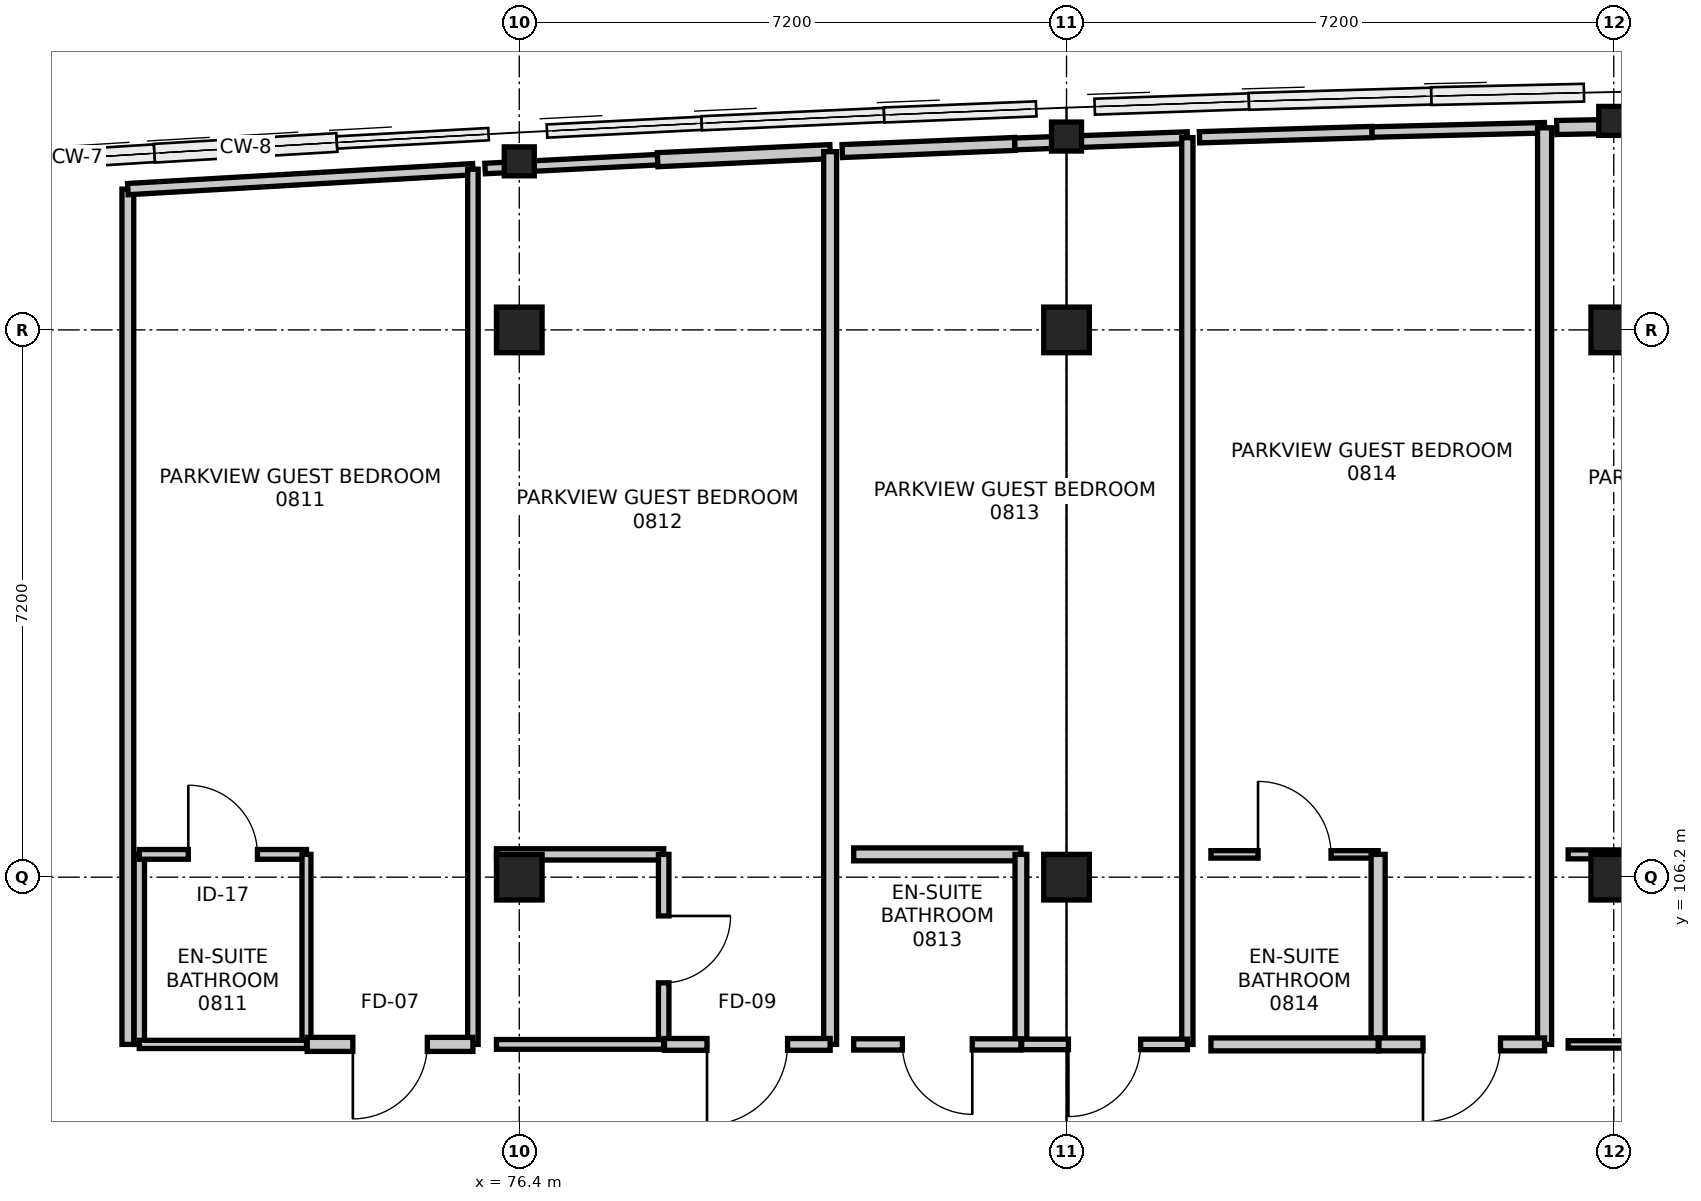
"""IFC4 building model, lengths in metres.
Left out: names, types, materials, properties, quantities, classifications, styles, units other than length and angle.
Written with IfcOpenShell. Run it as: python <this file> out.ifc"""

import sys

from ifc_helpers import new_model, si_unit, direction, frame, frame_2d, origin, origin_2d, place, context, subcontext, project, spatial, rectangle, i_section, extrude, element, fill, save


model = new_model("IFC4")
c1 = context("Model", 3, precision=1e-05, world=origin(), true_north=direction((0.0, 1.0)))
c2 = subcontext(c1, "Body", "Model", "MODEL_VIEW")
j1 = project(units=[si_unit("LENGTHUNIT", "METRE"), si_unit("PLANEANGLEUNIT", "RADIAN")], contexts=[c1])
p1 = place(None, origin())
s1 = spatial("IfcSite", under=j1, at=p1, CompositionType="ELEMENT")
p2 = place(p1, origin())
s2 = spatial("IfcBuilding", under=s1, at=p2, CompositionType="ELEMENT")
p3 = place(p2, frame((0.0, 0.0, 33.6)))
s3 = spatial("IfcBuildingStorey", under=s2, at=p3, CompositionType="ELEMENT", Elevation=33.6)
for number, where, z_axis, x_axis in (
    (1, (76.4, 106.2, 0.0), (0.0, 0.0, 1.0), (1.0, 0.0, 0.0)),
    (2, (76.4, 113.4, 0.0), (0.0, 0.0, 1.0), (1.0, 0.0, 0.0)),
):
    element("IfcColumn", number, at=place(p3, frame(where, z_axis=z_axis, x_axis=x_axis)), inside=s3, PredefinedType="COLUMN", context=c2, shape_type="SweptSolid", body=[
        extrude(rectangle(XDim=0.6, YDim=0.6, at=origin_2d()), origin(), (0.0, 0.0, 1.0), 3.6),
    ])
p4 = place(p3, frame((76.4, 115.618, 0.0), z_axis=(0.0, 0.0, 1.0), x_axis=(1.0, 0.0, 0.0)))
e3 = element("IfcColumn", 3, at=p4, inside=s3, PredefinedType="COLUMN", context=c2, shape_type="SweptSolid", body=[
    extrude(i_section(OverallWidth=0.395, OverallDepth=0.381, WebThickness=0.018, FlangeThickness=0.03, FilletRadius=0.015, at=origin_2d()), origin(), (0.0, 0.0, 1.0), 3.6),
])
for number, where, z_axis, x_axis in (
    (4, (83.6, 106.2, 0.0), (0.0, 0.0, 1.0), (1.0, 0.0, 0.0)),
    (5, (83.6, 113.4, 0.0), (0.0, 0.0, 1.0), (1.0, 0.0, 0.0)),
):
    element("IfcColumn", number, at=place(p3, frame(where, z_axis=z_axis, x_axis=x_axis)), inside=s3, PredefinedType="COLUMN", context=c2, shape_type="SweptSolid", body=[
        extrude(rectangle(XDim=0.6, YDim=0.6, at=origin_2d()), origin(), (0.0, 0.0, 1.0), 3.6),
    ])
p5 = place(p3, frame((83.6, 115.944, 0.0), z_axis=(0.0, 0.0, 1.0), x_axis=(1.0, 0.0, 0.0)))
e6 = element("IfcColumn", 6, at=p5, inside=s3, PredefinedType="COLUMN", context=c2, shape_type="SweptSolid", body=[
    extrude(i_section(OverallWidth=0.395, OverallDepth=0.381, WebThickness=0.018, FlangeThickness=0.03, FilletRadius=0.015, at=origin_2d()), origin(), (0.0, 0.0, 1.0), 3.6),
])
for number, where, z_axis, x_axis in (
    (7, (90.8, 106.2, 0.0), (0.0, 0.0, 1.0), (1.0, 0.0, 0.0)),
    (8, (90.8, 113.4, 0.0), (0.0, 0.0, 1.0), (1.0, 0.0, 0.0)),
):
    element("IfcColumn", number, at=place(p3, frame(where, z_axis=z_axis, x_axis=x_axis)), inside=s3, PredefinedType="COLUMN", context=c2, shape_type="SweptSolid", body=[
        extrude(rectangle(XDim=0.6, YDim=0.6, at=origin_2d()), origin(), (0.0, 0.0, 1.0), 3.6),
    ])
p6 = place(p3, frame((90.8, 116.15, 0.0), z_axis=(0.0, 0.0, 1.0), x_axis=(1.0, 0.0, 0.0)))
e9 = element("IfcColumn", 9, at=p6, inside=s3, PredefinedType="COLUMN", context=c2, shape_type="SweptSolid", body=[
    extrude(i_section(OverallWidth=0.395, OverallDepth=0.381, WebThickness=0.018, FlangeThickness=0.03, FilletRadius=0.015, at=origin_2d()), origin(), (0.0, 0.0, 1.0), 3.6),
])
p7 = place(p3, frame((71.4, 104.0, 0.0), z_axis=(0.0, 0.0, 1.0), x_axis=(0.0, 1.0, 0.0)))
e10 = element("IfcWall", 10, at=p7, inside=s3, PredefinedType="PARTITIONING", context=c2, shape_type="SweptSolid", body=[
    extrude(rectangle(XDim=2.5, YDim=0.138, at=frame_2d((1.25, 0.0))), origin(), (0.0, 0.0, 1.0), 2.745),
])
p8 = place(p3, frame((71.4, 106.5, 0.0), z_axis=(0.0, 0.0, 1.0), x_axis=(1.0, 0.0, 0.0)))
e11 = element("IfcWall", 11, at=p8, inside=s3, PredefinedType="PARTITIONING", context=c2, shape_type="SweptSolid", body=[
    extrude(rectangle(XDim=2.2, YDim=0.128, at=frame_2d((1.1, 0.0))), origin(), (0.0, 0.0, 1.0), 3.36),
])
p9 = place(p8, frame((0.645, 0.0, 0.0)))
e12 = element("IfcOpeningElement", 12, at=p9, cuts=e11, PredefinedType="OPENING", context=c2, shape_type="SweptSolid", body=[
    extrude(rectangle(XDim=0.91, YDim=2.11, at=frame_2d((0.455, 1.055))), frame((0.0, 0.074, 0.0), z_axis=(0.0, -1.0, 0.0), x_axis=(1.0, 0.0, 0.0)), (0.0, 0.0, 1.0), 0.148),
])
p10 = place(p3, frame((73.6, 106.5, 0.0), z_axis=(0.0, 0.0, 1.0), x_axis=(0.0, -1.0, 0.0)))
e13 = element("IfcWall", 13, at=p10, inside=s3, PredefinedType="PARTITIONING", context=c2, shape_type="SweptSolid", body=[
    extrude(rectangle(XDim=2.5, YDim=0.118, at=frame_2d((1.25, 0.0))), origin(), (0.0, 0.0, 1.0), 2.745),
])
p11 = place(p3, frame((73.6, 104.0, 0.0), z_axis=(0.0, 0.0, 1.0), x_axis=(-1.0, 0.0, 0.0)))
e14 = element("IfcWall", 14, at=p11, inside=s3, PredefinedType="PARTITIONING", context=c2, shape_type="SweptSolid", body=[
    extrude(rectangle(XDim=2.2, YDim=0.108, at=frame_2d((1.1, 0.0))), origin(), (0.0, 0.0, 1.0), 3.36),
])
p12 = place(p3, frame((71.25, 104.0, 0.0), z_axis=(0.0, 0.0, 1.0), x_axis=(0.0, 1.0, 0.0)))
e15 = element("IfcWall", 15, at=p12, inside=s3, PredefinedType="PARTITIONING", context=c2, shape_type="SweptSolid", body=[
    extrude(rectangle(XDim=11.252, YDim=0.155, at=frame_2d((5.626, 0.0))), origin(), (0.0, 0.0, 1.0), 2.745),
])
p13 = place(p3, frame((71.25, 115.252, 0.0), z_axis=(0.0, 0.0, 1.0), x_axis=(0.998342552715, 0.057551259223, 0.0)))
e16 = element("IfcWall", 16, at=p13, inside=s3, PredefinedType="PARTITIONING", context=c2, shape_type="SweptSolid", body=[
    extrude(rectangle(XDim=4.548, YDim=0.148, at=frame_2d((2.274, 0.0))), origin(), (0.0, 0.0, 1.0), 2.936),
])
p14 = place(p3, frame((75.79, 115.514, 0.0), z_axis=(0.0, 0.0, 1.0), x_axis=(0.0, -1.0, 0.0)))
e17 = element("IfcWall", 17, at=p14, inside=s3, PredefinedType="PARTITIONING", context=c2, shape_type="SweptSolid", body=[
    extrude(rectangle(XDim=11.514, YDim=0.138, at=frame_2d((5.757, 0.0))), origin(), (0.0, 0.0, 1.0), 2.745),
])
p15 = place(p3, frame((75.79, 104.0, 0.0), z_axis=(0.0, 0.0, 1.0), x_axis=(-1.0, 0.0, 0.0)))
e18 = element("IfcWall", 18, at=p15, inside=s3, PredefinedType="PARTITIONING", context=c2, shape_type="SweptSolid", body=[
    extrude(rectangle(XDim=2.18, YDim=0.185, at=frame_2d((1.09, 0.0))), origin(), (0.0, 0.0, 1.0), 3.36),
])
p16 = place(p15, frame((0.6, 0.0, 0.0)))
e19 = element("IfcOpeningElement", 19, at=p16, cuts=e18, PredefinedType="OPENING", context=c2, shape_type="SweptSolid", body=[
    extrude(rectangle(XDim=0.98, YDim=2.15, at=frame_2d((0.49, 1.075))), frame((0.0, 0.103, 0.0), z_axis=(0.0, -1.0, 0.0), x_axis=(1.0, 0.0, 0.0)), (0.0, 0.0, 1.0), 0.205),
])
p17 = place(p3, frame((76.1, 106.5, 0.0), z_axis=(0.0, 0.0, 1.0), x_axis=(1.0, 0.0, 0.0)))
e20 = element("IfcWall", 20, at=p17, inside=s3, PredefinedType="PARTITIONING", context=c2, shape_type="SweptSolid", body=[
    extrude(rectangle(XDim=2.2, YDim=0.148, at=frame_2d((1.1, 0.0))), origin(), (0.0, 0.0, 1.0), 2.695),
])
p18 = place(p3, frame((78.3, 106.5, 0.0), z_axis=(0.0, 0.0, 1.0), x_axis=(0.0, -1.0, 0.0)))
e21 = element("IfcWall", 21, at=p18, inside=s3, PredefinedType="PARTITIONING", context=c2, shape_type="SweptSolid", body=[
    extrude(rectangle(XDim=2.5, YDim=0.138, at=frame_2d((1.25, 0.0))), origin(), (0.0, 0.0, 1.0), 2.745),
])
p19 = place(p18, frame((0.81, 0.0, 0.0)))
e22 = element("IfcOpeningElement", 22, at=p19, cuts=e21, PredefinedType="OPENING", context=c2, shape_type="SweptSolid", body=[
    extrude(rectangle(XDim=0.88, YDim=2.06, at=frame_2d((0.44, 1.03))), frame((0.0, 0.079, 0.0), z_axis=(0.0, -1.0, 0.0), x_axis=(1.0, 0.0, 0.0)), (0.0, 0.0, 1.0), 0.158),
])
p20 = place(p3, frame((78.3, 104.0, 0.0), z_axis=(0.0, 0.0, 1.0), x_axis=(-1.0, 0.0, 0.0)))
e23 = element("IfcWall", 23, at=p20, inside=s3, PredefinedType="PARTITIONING", context=c2, shape_type="SweptSolid", body=[
    extrude(rectangle(XDim=2.2, YDim=0.128, at=frame_2d((1.1, 0.0))), origin(), (0.0, 0.0, 1.0), 2.695),
])
p21 = place(p3, frame((75.95, 115.523, 0.0), z_axis=(0.0, 0.0, 1.0), x_axis=(0.99869216728, 0.051126852186, 0.0)))
e24 = element("IfcWall", 24, at=p21, inside=s3, PredefinedType="PARTITIONING", context=c2, shape_type="SweptSolid", body=[
    extrude(rectangle(XDim=2.273, YDim=0.138, at=frame_2d((1.136, 0.0))), origin(), (0.0, 0.0, 1.0), 2.936),
])
p22 = place(p3, frame((78.22, 115.639, 0.0), z_axis=(0.0, 0.0, 1.0), x_axis=(0.998907409999, 0.04673313867, 0.0)))
e25 = element("IfcWall", 25, at=p22, inside=s3, PredefinedType="PARTITIONING", context=c2, shape_type="SweptSolid", body=[
    extrude(rectangle(XDim=2.272, YDim=0.185, at=frame_2d((1.136, 0.0))), origin(), (0.0, 0.0, 1.0), 2.936),
])
p23 = place(p3, frame((80.49, 115.745, 0.0), z_axis=(0.0, 0.0, 1.0), x_axis=(0.0, -1.0, 0.0)))
e26 = element("IfcWall", 26, at=p23, inside=s3, PredefinedType="PARTITIONING", context=c2, shape_type="SweptSolid", body=[
    extrude(rectangle(XDim=11.745, YDim=0.17, at=frame_2d((5.873, 0.0))), origin(), (0.0, 0.0, 1.0), 2.745),
])
p24 = place(p3, frame((80.49, 104.0, 0.0), z_axis=(0.0, 0.0, 1.0), x_axis=(-1.0, 0.0, 0.0)))
e27 = element("IfcWall", 27, at=p24, inside=s3, PredefinedType="PARTITIONING", context=c2, shape_type="SweptSolid", body=[
    extrude(rectangle(XDim=2.18, YDim=0.155, at=frame_2d((1.09, 0.0))), origin(), (0.0, 0.0, 1.0), 3.36),
])
p25 = place(p24, frame((0.56, 0.0, 0.0)))
e28 = element("IfcOpeningElement", 28, at=p25, cuts=e27, PredefinedType="OPENING", context=c2, shape_type="SweptSolid", body=[
    extrude(rectangle(XDim=1.06, YDim=2.2, at=frame_2d((0.53, 1.1))), frame((0.0, 0.087, 0.0), z_axis=(0.0, -1.0, 0.0), x_axis=(1.0, 0.0, 0.0)), (0.0, 0.0, 1.0), 0.175),
])
p26 = place(p3, frame((80.8, 106.5, 0.0), z_axis=(0.0, 0.0, 1.0), x_axis=(1.0, 0.0, 0.0)))
e29 = element("IfcWall", 29, at=p26, inside=s3, PredefinedType="PARTITIONING", context=c2, shape_type="SweptSolid", body=[
    extrude(rectangle(XDim=2.2, YDim=0.17, at=frame_2d((1.1, 0.0))), origin(), (0.0, 0.0, 1.0), 2.745),
])
p27 = place(p3, frame((83.0, 106.5, 0.0), z_axis=(0.0, 0.0, 1.0), x_axis=(0.0, -1.0, 0.0)))
e30 = element("IfcWall", 30, at=p27, inside=s3, PredefinedType="PARTITIONING", context=c2, shape_type="SweptSolid", body=[
    extrude(rectangle(XDim=2.5, YDim=0.155, at=frame_2d((1.25, 0.0))), origin(), (0.0, 0.0, 1.0), 2.745),
])
p28 = place(p3, frame((83.0, 104.0, 0.0), z_axis=(0.0, 0.0, 1.0), x_axis=(-1.0, 0.0, 0.0)))
e31 = element("IfcWall", 31, at=p28, inside=s3, PredefinedType="PARTITIONING", context=c2, shape_type="SweptSolid", body=[
    extrude(rectangle(XDim=2.2, YDim=0.148, at=frame_2d((1.1, 0.0))), origin(), (0.0, 0.0, 1.0), 3.36),
])
p29 = place(p28, frame((0.64, 0.0, 0.0)))
e32 = element("IfcOpeningElement", 32, at=p29, cuts=e31, PredefinedType="OPENING", context=c2, shape_type="SweptSolid", body=[
    extrude(rectangle(XDim=0.92, YDim=2.1, at=frame_2d((0.46, 1.05))), frame((0.0, 0.084, 0.0), z_axis=(0.0, -1.0, 0.0), x_axis=(1.0, 0.0, 0.0)), (0.0, 0.0, 1.0), 0.168),
])
p30 = place(p3, frame((80.65, 115.753, 0.0), z_axis=(0.0, 0.0, 1.0), x_axis=(0.999143841124, 0.041371303381, 0.0)))
e33 = element("IfcWall", 33, at=p30, inside=s3, PredefinedType="PARTITIONING", context=c2, shape_type="SweptSolid", body=[
    extrude(rectangle(XDim=2.272, YDim=0.17, at=frame_2d((1.136, 0.0))), origin(), (0.0, 0.0, 1.0), 2.936),
])
p31 = place(p3, frame((82.92, 115.847, 0.0), z_axis=(0.0, 0.0, 1.0), x_axis=(0.999343819839, 0.036220570799, 0.0)))
e34 = element("IfcWall", 34, at=p31, inside=s3, PredefinedType="PARTITIONING", context=c2, shape_type="SweptSolid", body=[
    extrude(rectangle(XDim=2.271, YDim=0.155, at=frame_2d((1.136, 0.0))), origin(), (0.0, 0.0, 1.0), 2.936),
])
p32 = place(p3, frame((85.19, 115.929, 0.0), z_axis=(0.0, 0.0, 1.0), x_axis=(0.0, -1.0, 0.0)))
e35 = element("IfcWall", 35, at=p32, inside=s3, PredefinedType="PARTITIONING", context=c2, shape_type="SweptSolid", body=[
    extrude(rectangle(XDim=11.929, YDim=0.148, at=frame_2d((5.964, 0.0))), origin(), (0.0, 0.0, 1.0), 2.745),
])
p33 = place(p3, frame((85.19, 104.0, 0.0), z_axis=(0.0, 0.0, 1.0), x_axis=(-1.0, 0.0, 0.0)))
e36 = element("IfcWall", 36, at=p33, inside=s3, PredefinedType="PARTITIONING", context=c2, shape_type="SweptSolid", body=[
    extrude(rectangle(XDim=2.18, YDim=0.138, at=frame_2d((1.09, 0.0))), origin(), (0.0, 0.0, 1.0), 2.695),
])
p34 = place(p33, frame((0.615, 0.0, 0.0)))
e37 = element("IfcOpeningElement", 37, at=p34, cuts=e36, PredefinedType="OPENING", context=c2, shape_type="SweptSolid", body=[
    extrude(rectangle(XDim=0.95, YDim=2.1, at=frame_2d((0.475, 1.05))), frame((0.0, 0.079, 0.0), z_axis=(0.0, -1.0, 0.0), x_axis=(1.0, 0.0, 0.0)), (0.0, 0.0, 1.0), 0.158),
])
p35 = place(p3, frame((85.5, 106.5, 0.0), z_axis=(0.0, 0.0, 1.0), x_axis=(1.0, 0.0, 0.0)))
e38 = element("IfcWall", 38, at=p35, inside=s3, PredefinedType="PARTITIONING", context=c2, shape_type="SweptSolid", body=[
    extrude(rectangle(XDim=2.2, YDim=0.098, at=frame_2d((1.1, 0.0))), origin(), (0.0, 0.0, 1.0), 3.36),
])
p36 = place(p35, frame((0.62, 0.0, 0.0)))
e39 = element("IfcOpeningElement", 39, at=p36, cuts=e38, PredefinedType="OPENING", context=c2, shape_type="SweptSolid", body=[
    extrude(rectangle(XDim=0.96, YDim=2.14, at=frame_2d((0.48, 1.07))), frame((0.0, 0.059, 0.0), z_axis=(0.0, -1.0, 0.0), x_axis=(1.0, 0.0, 0.0)), (0.0, 0.0, 1.0), 0.118),
])
p37 = place(p3, frame((87.7, 106.5, 0.0), z_axis=(0.0, 0.0, 1.0), x_axis=(0.0, -1.0, 0.0)))
e40 = element("IfcWall", 40, at=p37, inside=s3, PredefinedType="PARTITIONING", context=c2, shape_type="SweptSolid", body=[
    extrude(rectangle(XDim=2.5, YDim=0.185, at=frame_2d((1.25, 0.0))), origin(), (0.0, 0.0, 1.0), 2.745),
])
p38 = place(p3, frame((87.7, 104.0, 0.0), z_axis=(0.0, 0.0, 1.0), x_axis=(-1.0, 0.0, 0.0)))
e41 = element("IfcWall", 41, at=p38, inside=s3, PredefinedType="PARTITIONING", context=c2, shape_type="SweptSolid", body=[
    extrude(rectangle(XDim=2.2, YDim=0.17, at=frame_2d((1.1, 0.0))), origin(), (0.0, 0.0, 1.0), 3.36),
])
p39 = place(p3, frame((85.35, 115.935, 0.0), z_axis=(0.0, 0.0, 1.0), x_axis=(0.999540389811, 0.030315163468, 0.0)))
e42 = element("IfcWall", 42, at=p39, inside=s3, PredefinedType="PARTITIONING", context=c2, shape_type="SweptSolid", body=[
    extrude(rectangle(XDim=2.271, YDim=0.148, at=frame_2d((1.135, 0.0))), origin(), (0.0, 0.0, 1.0), 2.936),
])
p40 = place(p3, frame((87.62, 116.003, 0.0), z_axis=(0.0, 0.0, 1.0), x_axis=(0.999696780071, 0.024624132799, 0.0)))
e43 = element("IfcWall", 43, at=p40, inside=s3, PredefinedType="PARTITIONING", context=c2, shape_type="SweptSolid", body=[
    extrude(rectangle(XDim=2.271, YDim=0.138, at=frame_2d((1.135, 0.0))), origin(), (0.0, 0.0, 1.0), 2.936),
])
p41 = place(p3, frame((89.89, 116.059, 0.0), z_axis=(0.0, 0.0, 1.0), x_axis=(0.0, -1.0, 0.0)))
e44 = element("IfcWall", 44, at=p41, inside=s3, PredefinedType="PARTITIONING", context=c2, shape_type="SweptSolid", body=[
    extrude(rectangle(XDim=12.059, YDim=0.185, at=frame_2d((6.03, 0.0))), origin(), (0.0, 0.0, 1.0), 2.745),
])
p42 = place(p3, frame((89.89, 104.0, 0.0), z_axis=(0.0, 0.0, 1.0), x_axis=(-1.0, 0.0, 0.0)))
e45 = element("IfcWall", 45, at=p42, inside=s3, PredefinedType="PARTITIONING", context=c2, shape_type="SweptSolid", body=[
    extrude(rectangle(XDim=2.18, YDim=0.17, at=frame_2d((1.09, 0.0))), origin(), (0.0, 0.0, 1.0), 3.36),
])
p43 = place(p42, frame((0.58, 0.0, 0.0)))
e46 = element("IfcOpeningElement", 46, at=p43, cuts=e45, PredefinedType="OPENING", context=c2, shape_type="SweptSolid", body=[
    extrude(rectangle(XDim=1.02, YDim=2.15, at=frame_2d((0.51, 1.075))), frame((0.0, 0.095, 0.0), z_axis=(0.0, -1.0, 0.0), x_axis=(1.0, 0.0, 0.0)), (0.0, 0.0, 1.0), 0.19),
])
p44 = place(p3, frame((90.2, 106.5, 0.0), z_axis=(0.0, 0.0, 1.0), x_axis=(1.0, 0.0, 0.0)))
e47 = element("IfcWall", 47, at=p44, inside=s3, PredefinedType="PARTITIONING", context=c2, shape_type="SweptSolid", body=[
    extrude(rectangle(XDim=2.2, YDim=0.118, at=frame_2d((1.1, 0.0))), origin(), (0.0, 0.0, 1.0), 2.695),
])
p45 = place(p3, frame((92.4, 104.0, 0.0), z_axis=(0.0, 0.0, 1.0), x_axis=(-1.0, 0.0, 0.0)))
e48 = element("IfcWall", 48, at=p45, inside=s3, PredefinedType="PARTITIONING", context=c2, shape_type="SweptSolid", body=[
    extrude(rectangle(XDim=2.2, YDim=0.098, at=frame_2d((1.1, 0.0))), origin(), (0.0, 0.0, 1.0), 2.695),
])
p46 = place(p3, frame((90.05, 116.063, 0.0), z_axis=(0.0, 0.0, 1.0), x_axis=(0.999830927494, 0.018387942418, 0.0)))
e49 = element("IfcWall", 49, at=p46, inside=s3, PredefinedType="PARTITIONING", context=c2, shape_type="SweptSolid", body=[
    extrude(rectangle(XDim=2.271, YDim=0.185, at=frame_2d((1.135, 0.0))), origin(), (0.0, 0.0, 1.0), 2.936),
])
p47 = place(p9, origin())
e50 = element("IfcDoor", 50, at=p47, inside=s3, OperationType="SINGLE_SWING_LEFT", PredefinedType="DOOR", context=c2, shape_type="SweptSolid", body=[
    extrude(rectangle(XDim=0.91, YDim=2.11, at=frame_2d((0.455, 1.055))), frame((0.0, 0.025, 0.0), z_axis=(0.0, -1.0, 0.0), x_axis=(1.0, 0.0, 0.0)), (0.0, 0.0, 1.0), 0.05),
])
fill(e12, e50)
p48 = place(p16, origin())
e51 = element("IfcDoor", 51, at=p48, inside=s3, OperationType="SINGLE_SWING_RIGHT", PredefinedType="DOOR", context=c2, shape_type="SweptSolid", body=[
    extrude(rectangle(XDim=0.98, YDim=2.15, at=frame_2d((0.49, 1.075))), frame((0.0, 0.025, 0.0), z_axis=(0.0, -1.0, 0.0), x_axis=(1.0, 0.0, 0.0)), (0.0, 0.0, 1.0), 0.05),
])
fill(e19, e51)
p49 = place(p19, origin())
e52 = element("IfcDoor", 52, at=p49, inside=s3, OperationType="SINGLE_SWING_LEFT", PredefinedType="DOOR", context=c2, shape_type="SweptSolid", body=[
    extrude(rectangle(XDim=0.88, YDim=2.06, at=frame_2d((0.44, 1.03))), frame((0.0, 0.025, 0.0), z_axis=(0.0, -1.0, 0.0), x_axis=(1.0, 0.0, 0.0)), (0.0, 0.0, 1.0), 0.05),
])
fill(e22, e52)
p50 = place(p25, origin())
e53 = element("IfcDoor", 53, at=p50, inside=s3, OperationType="SINGLE_SWING_RIGHT", PredefinedType="DOOR", context=c2, shape_type="SweptSolid", body=[
    extrude(rectangle(XDim=1.06, YDim=2.2, at=frame_2d((0.53, 1.1))), frame((0.0, 0.025, 0.0), z_axis=(0.0, -1.0, 0.0), x_axis=(1.0, 0.0, 0.0)), (0.0, 0.0, 1.0), 0.05),
])
fill(e28, e53)
p51 = place(p29, origin())
e54 = element("IfcDoor", 54, at=p51, inside=s3, OperationType="SINGLE_SWING_LEFT", PredefinedType="DOOR", context=c2, shape_type="SweptSolid", body=[
    extrude(rectangle(XDim=0.92, YDim=2.1, at=frame_2d((0.46, 1.05))), frame((0.0, 0.025, 0.0), z_axis=(0.0, -1.0, 0.0), x_axis=(1.0, 0.0, 0.0)), (0.0, 0.0, 1.0), 0.05),
])
fill(e32, e54)
p52 = place(p34, origin())
e55 = element("IfcDoor", 55, at=p52, inside=s3, OperationType="SINGLE_SWING_RIGHT", PredefinedType="DOOR", context=c2, shape_type="SweptSolid", body=[
    extrude(rectangle(XDim=0.95, YDim=2.1, at=frame_2d((0.475, 1.05))), frame((0.0, 0.025, 0.0), z_axis=(0.0, -1.0, 0.0), x_axis=(1.0, 0.0, 0.0)), (0.0, 0.0, 1.0), 0.05),
])
fill(e37, e55)
p53 = place(p36, origin())
e56 = element("IfcDoor", 56, at=p53, inside=s3, OperationType="SINGLE_SWING_LEFT", PredefinedType="DOOR", context=c2, shape_type="SweptSolid", body=[
    extrude(rectangle(XDim=0.96, YDim=2.14, at=frame_2d((0.48, 1.07))), frame((0.0, 0.025, 0.0), z_axis=(0.0, -1.0, 0.0), x_axis=(1.0, 0.0, 0.0)), (0.0, 0.0, 1.0), 0.05),
])
fill(e39, e56)
p54 = place(p43, origin())
e57 = element("IfcDoor", 57, at=p54, inside=s3, OperationType="SINGLE_SWING_RIGHT", PredefinedType="DOOR", context=c2, shape_type="SweptSolid", body=[
    extrude(rectangle(XDim=1.02, YDim=2.15, at=frame_2d((0.51, 1.075))), frame((0.0, 0.025, 0.0), z_axis=(0.0, -1.0, 0.0), x_axis=(1.0, 0.0, 0.0)), (0.0, 0.0, 1.0), 0.05),
])
fill(e46, e57)
save(model, sys.argv[1])
